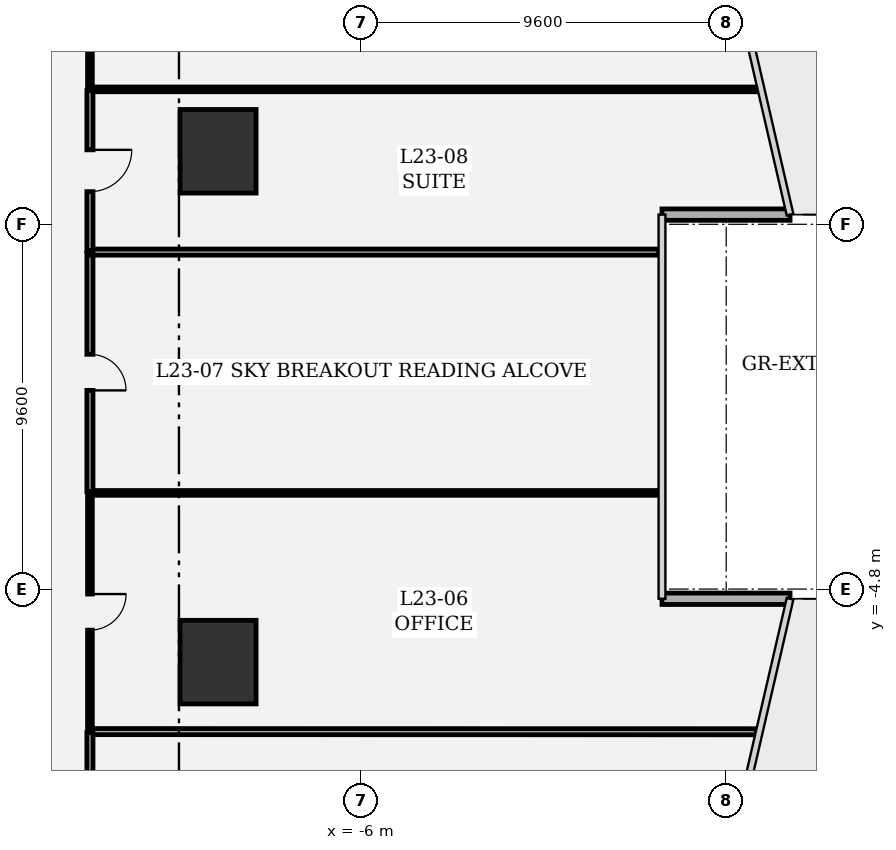
"""IFC4 building model, lengths in metres.
Left out: names, types, materials, properties, quantities, classifications, styles, units other than length and angle.
Written with IfcOpenShell. Run it as: python <this file> out.ifc"""

import sys

from ifc_helpers import new_model, si_unit, direction, frame, frame_2d, origin, origin_2d, place, context, subcontext, project, spatial, rectangle, extrude, element, fill, save


model = new_model("IFC4")
c1 = context("Model", 3, precision=1e-05, world=origin(), true_north=direction((0.0, 1.0)))
c2 = subcontext(c1, "Body", "Model", "MODEL_VIEW")
j1 = project(units=[si_unit("LENGTHUNIT", "METRE"), si_unit("PLANEANGLEUNIT", "RADIAN")], contexts=[c1])
p1 = place(None, origin())
s1 = spatial("IfcSite", under=j1, at=p1, CompositionType="ELEMENT")
p2 = place(p1, origin())
s2 = spatial("IfcBuilding", under=s1, at=p2, CompositionType="ELEMENT")
p3 = place(p2, frame((0.0, 0.0, 105.0)))
s3 = spatial("IfcBuildingStorey", under=s2, at=p3, CompositionType="ELEMENT", Elevation=105.0)
for number, where, z_axis, x_axis in (
    (1, (-9.77, -6.721, 0.0), (0.0, 0.0, 1.0), (1.0, 0.0, 0.0)),
    (2, (-9.77, 6.721, 0.0), (0.0, 0.0, 1.0), (1.0, 0.0, 0.0)),
):
    element("IfcColumn", number, at=place(p3, frame(where, z_axis=z_axis, x_axis=x_axis)), inside=s3, PredefinedType="COLUMN", context=c2, shape_type="SweptSolid", body=[
        extrude(rectangle(XDim=2.0, YDim=2.2, at=origin_2d()), origin(), (0.0, 0.0, 1.0), 4.8),
    ])
for number, where, z_axis, x_axis in (
    (3, (5.28, -5.054, 0.0), (0.0, 0.0, 1.0), (-1.0, 0.0, 0.0)),
    (4, (1.91, 5.054, 0.0), (0.0, 0.0, 1.0), (1.0, 0.0, 0.0)),
):
    element("IfcWall", number, at=place(p3, frame(where, z_axis=z_axis, x_axis=x_axis)), inside=s3, PredefinedType="SOLIDWALL", context=c2, shape_type="SweptSolid", body=[
        extrude(rectangle(XDim=3.37, YDim=0.3, at=frame_2d((1.685, 0.0))), origin(), (0.0, 0.0, 1.0), 4.52),
    ])
p4 = place(p3, frame((-13.142, 10.733, 0.0), z_axis=(0.0, 0.0, 1.0), x_axis=(0.0, -1.0, 0.0)))
e5 = element("IfcWall", 5, at=p4, inside=s3, PredefinedType="PARTITIONING", context=c2, shape_type="SweptSolid", body=[
    extrude(rectangle(XDim=2.358, YDim=0.125, at=frame_2d((1.179, 0.0))), origin(), (0.0, 0.0, 1.0), 4.52),
])
p5 = place(p3, frame((-13.117, 8.35, 0.0), z_axis=(0.0, 0.0, 1.0), x_axis=(1.0, 0.0, 0.0)))
e6 = element("IfcWall", 6, at=p5, inside=s3, PredefinedType="PARTITIONING", context=c2, shape_type="SweptSolid", body=[
    extrude(rectangle(XDim=17.556, YDim=0.125, at=frame_2d((8.778, 0.0))), origin(), (0.0, 0.0, 1.0), 3.635),
])
p6 = place(p3, frame((4.392, -8.554, 0.0), z_axis=(0.0, 0.0, 1.0), x_axis=(-0.999999968502, 0.000250990008, 0.0)))
e7 = element("IfcWall", 7, at=p6, inside=s3, PredefinedType="PARTITIONING", context=c2, shape_type="SweptSolid", body=[
    extrude(rectangle(XDim=17.509, YDim=0.16, at=frame_2d((8.754, 0.0))), origin(), (0.0, 0.0, 1.0), 3.635),
])
p7 = place(p3, frame((-13.142, -8.575, 0.0), z_axis=(0.0, 0.0, 1.0), x_axis=(0.0, -1.0, 0.0)))
e8 = element("IfcWall", 8, at=p7, inside=s3, PredefinedType="PARTITIONING", context=c2, shape_type="SweptSolid", body=[
    extrude(rectangle(XDim=2.358, YDim=0.16, at=frame_2d((1.179, 0.0))), origin(), (0.0, 0.0, 1.0), 4.52),
])
p8 = place(p3, frame((1.831, -2.269, 0.0), z_axis=(0.0, 0.0, 1.0), x_axis=(-1.0, 0.0, 0.0)))
e9 = element("IfcWall", 9, at=p8, inside=s3, PredefinedType="PARTITIONING", context=c2, shape_type="SweptSolid", body=[
    extrude(rectangle(XDim=14.948, YDim=0.125, at=frame_2d((7.474, 0.0))), origin(), (0.0, 0.0, 1.0), 4.52),
])
p9 = place(p3, frame((-13.142, -2.294, 0.0), z_axis=(0.0, 0.0, 1.0), x_axis=(0.0, -1.0, 0.0)))
e10 = element("IfcWall", 10, at=p9, inside=s3, PredefinedType="PARTITIONING", context=c2, shape_type="SweptSolid", body=[
    extrude(rectangle(XDim=6.223, YDim=0.125, at=frame_2d((3.112, 0.0))), origin(), (0.0, 0.0, 1.0), 4.52),
])
p10 = place(p9, frame((2.637, 0.0, 0.0)))
e11 = element("IfcOpeningElement", 11, at=p10, cuts=e10, PredefinedType="OPENING", context=c2, shape_type="SweptSolid", body=[
    extrude(rectangle(XDim=0.95, YDim=2.15, at=frame_2d((0.475, 1.075))), frame((0.0, 0.073, 0.0), z_axis=(0.0, -1.0, 0.0), x_axis=(1.0, 0.0, 0.0)), (0.0, 0.0, 1.0), 0.145),
])
p11 = place(p3, frame((-13.142, 4.043, 0.0), z_axis=(0.0, 0.0, 1.0), x_axis=(0.0, -1.0, 0.0)))
e12 = element("IfcWall", 12, at=p11, inside=s3, PredefinedType="PARTITIONING", context=c2, shape_type="SweptSolid", body=[
    extrude(rectangle(XDim=6.279, YDim=0.16, at=frame_2d((3.14, 0.0))), origin(), (0.0, 0.0, 1.0), 4.52),
])
p12 = place(p11, frame((2.665, 0.0, 0.0)))
e13 = element("IfcOpeningElement", 13, at=p12, cuts=e12, PredefinedType="OPENING", context=c2, shape_type="SweptSolid", body=[
    extrude(rectangle(XDim=0.95, YDim=2.15, at=frame_2d((0.475, 1.075))), frame((0.0, 0.09, 0.0), z_axis=(0.0, -1.0, 0.0), x_axis=(1.0, 0.0, 0.0)), (0.0, 0.0, 1.0), 0.18),
])
p13 = place(p3, frame((1.831, 4.068, 0.0), z_axis=(0.0, 0.0, 1.0), x_axis=(-1.0, 0.0, 0.0)))
e14 = element("IfcWall", 14, at=p13, inside=s3, PredefinedType="PARTITIONING", context=c2, shape_type="SweptSolid", body=[
    extrude(rectangle(XDim=14.948, YDim=0.16, at=frame_2d((7.474, 0.0))), origin(), (0.0, 0.0, 1.0), 4.52),
])
p14 = place(p3, frame((-13.142, 8.317, 0.0), z_axis=(0.0, 0.0, 1.0), x_axis=(0.0, -1.0, 0.0)))
e15 = element("IfcWall", 15, at=p14, inside=s3, PredefinedType="PARTITIONING", context=c2, shape_type="SweptSolid", body=[
    extrude(rectangle(XDim=4.216, YDim=0.16, at=frame_2d((2.108, 0.0))), origin(), (0.0, 0.0, 1.0), 4.52),
])
p15 = place(p14, frame((1.558, 0.0, 0.0)))
e16 = element("IfcOpeningElement", 16, at=p15, cuts=e15, PredefinedType="OPENING", context=c2, shape_type="SweptSolid", body=[
    extrude(rectangle(XDim=1.1, YDim=2.15, at=frame_2d((0.55, 1.075))), frame((0.0, 0.09, 0.0), z_axis=(0.0, -1.0, 0.0), x_axis=(1.0, 0.0, 0.0)), (0.0, 0.0, 1.0), 0.18),
])
p16 = place(p10, origin())
e17 = element("IfcDoor", 17, at=p16, inside=s3, OperationType="SINGLE_SWING_LEFT", PredefinedType="DOOR", context=c2, shape_type="SweptSolid", body=[
    extrude(rectangle(XDim=0.95, YDim=2.15, at=frame_2d((0.475, 1.075))), frame((0.0, 0.025, 0.0), z_axis=(0.0, -1.0, 0.0), x_axis=(1.0, 0.0, 0.0)), (0.0, 0.0, 1.0), 0.05),
])
fill(e11, e17)
p17 = place(p12, origin())
e18 = element("IfcDoor", 18, at=p17, inside=s3, OperationType="SINGLE_SWING_RIGHT", PredefinedType="DOOR", context=c2, shape_type="SweptSolid", body=[
    extrude(rectangle(XDim=0.95, YDim=2.15, at=frame_2d((0.475, 1.075))), frame((0.0, 0.025, 0.0), z_axis=(0.0, -1.0, 0.0), x_axis=(1.0, 0.0, 0.0)), (0.0, 0.0, 1.0), 0.05),
])
fill(e13, e18)
p18 = place(p15, origin())
e19 = element("IfcDoor", 19, at=p18, inside=s3, OperationType="SINGLE_SWING_LEFT", PredefinedType="DOOR", context=c2, shape_type="SweptSolid", body=[
    extrude(rectangle(XDim=1.1, YDim=2.15, at=frame_2d((0.55, 1.075))), frame((0.0, 0.025, 0.0), z_axis=(0.0, -1.0, 0.0), x_axis=(1.0, 0.0, 0.0)), (0.0, 0.0, 1.0), 0.05),
])
fill(e16, e19)
save(model, sys.argv[1])
